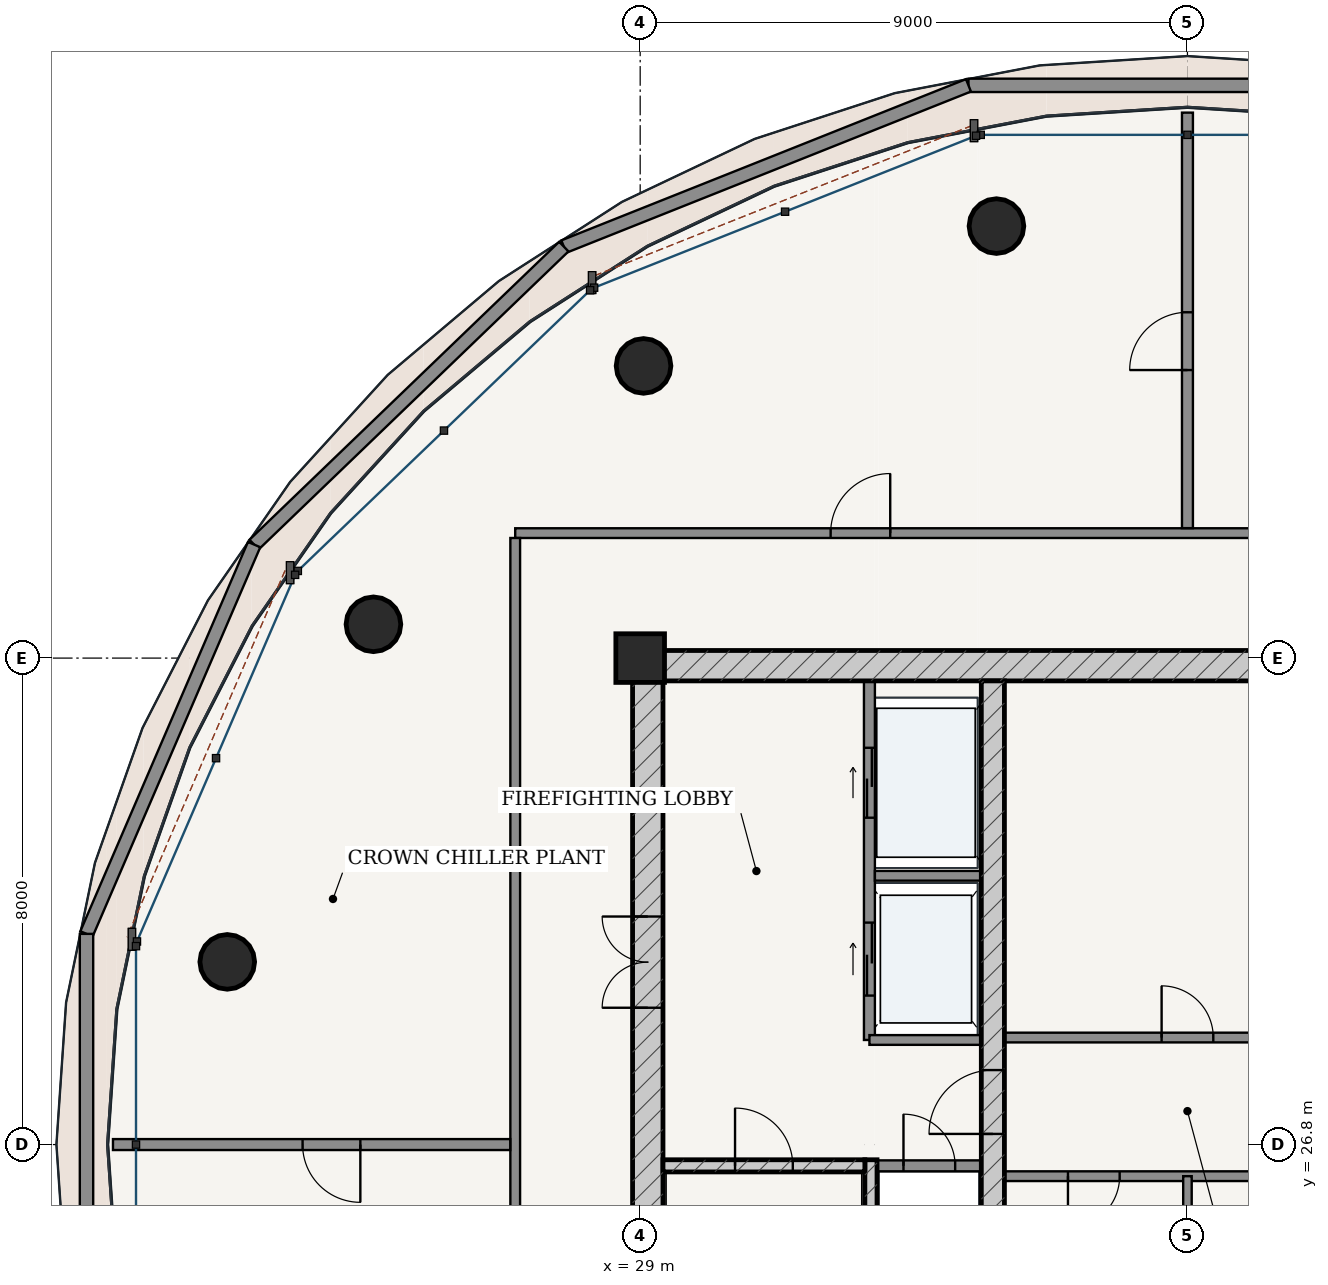
"""IFC4 building model, lengths in metres.
Left out: names, types, materials, properties, quantities, classifications, styles, units other than length and angle.
Written with IfcOpenShell. Run it as: python <this file> out.ifc"""

import sys

from ifc_helpers import new_model, si_unit, direction, frame, frame_2d, origin, origin_2d, place, context, subcontext, project, spatial, rectangle, hollow_circle, extrude, source, transform, mapped, element, fill, save


model = new_model("IFC4")
c1 = context("Model", 3, precision=1e-05, world=origin(), true_north=direction((-0.2419218956, 0.970295726276)))
c2 = subcontext(c1, "Body", "Model", "MODEL_VIEW")
j1 = project(units=[si_unit("LENGTHUNIT", "METRE"), si_unit("PLANEANGLEUNIT", "RADIAN")], contexts=[c1])
p1 = place(None, origin())
s1 = spatial("IfcSite", under=j1, at=p1, CompositionType="ELEMENT")
p2 = place(p1, origin())
s2 = spatial("IfcBuilding", under=s1, at=p2, CompositionType="ELEMENT")
p3 = place(p2, frame((0.0, 0.0, 306.1)))
s3 = spatial("IfcBuildingStorey", under=s2, at=p3, CompositionType="ELEMENT", Elevation=306.1)
p4 = place(p3, frame((29.0, 34.8, 0.0), z_axis=(0.0, 0.0, 1.0), x_axis=(1.0, 0.0, 0.0)))
e1 = element("IfcColumn", 1, at=p4, inside=s3, PredefinedType="COLUMN", context=c2, shape_type="SweptSolid", body=[
    extrude(rectangle(XDim=0.8, YDim=0.8, at=origin_2d()), origin(), (0.0, 0.0, 1.0), 5.2),
])
p5 = place(p3, frame((28.875, 34.675, 0.0), z_axis=(0.0, 0.0, 1.0), x_axis=(1.0, 0.0, 0.0)))
e2 = element("IfcWall", 2, at=p5, inside=s3, PredefinedType="SHEAR", context=c2, shape_type="SweptSolid", body=[
    extrude(rectangle(XDim=18.25, YDim=0.5, at=frame_2d((9.125, 0.0))), origin(), (0.0, 0.0, 1.0), 4.78),
])
p6 = place(p3, frame((29.125, 19.175, 0.0), z_axis=(0.0, 0.0, 1.0), x_axis=(0.0, 1.0, 0.0)))
e3 = element("IfcWall", 3, at=p6, inside=s3, PredefinedType="SHEAR", context=c2, shape_type="SweptSolid", body=[
    extrude(rectangle(XDim=15.25, YDim=0.5, at=frame_2d((7.625, 0.0))), origin(), (0.0, 0.0, 1.0), 4.78),
])
p7 = place(p6, frame((9.875, 0.0, 0.0)))
e4 = element("IfcOpeningElement", 4, at=p7, cuts=e3, PredefinedType="OPENING", context=c2, shape_type="SweptSolid", body=[
    extrude(rectangle(XDim=1.5, YDim=2.2, at=frame_2d((0.75, 1.1))), frame((0.0, 0.26, 0.0), z_axis=(0.0, -1.0, 0.0), x_axis=(1.0, 0.0, 0.0)), (0.0, 0.0, 1.0), 0.52),
])
p8 = place(p3, frame((32.795, 19.175, 0.0), z_axis=(0.0, 0.0, 1.0), x_axis=(0.0, 1.0, 0.0)))
e5 = element("IfcWall", 5, at=p8, inside=s3, PredefinedType="SOLIDWALL", context=c2, shape_type="SweptSolid", body=[
    extrude(rectangle(XDim=7.375, YDim=0.2, at=frame_2d((3.688, 0.0))), origin(), (0.0, 0.0, 1.0), 4.78),
])
p9 = place(p3, frame((29.375, 26.45, 0.0), z_axis=(0.0, 0.0, 1.0), x_axis=(1.0, 0.0, 0.0)))
e6 = element("IfcWall", 6, at=p9, inside=s3, PredefinedType="SOLIDWALL", context=c2, shape_type="SweptSolid", body=[
    extrude(rectangle(XDim=3.32, YDim=0.2, at=frame_2d((1.66, 0.0))), origin(), (0.0, 0.0, 1.0), 4.78),
])
p10 = place(p9, frame((1.185, 0.0, 0.0)))
e7 = element("IfcOpeningElement", 7, at=p10, cuts=e6, PredefinedType="OPENING", context=c2, shape_type="SweptSolid", body=[
    extrude(rectangle(XDim=0.95, YDim=2.15, at=frame_2d((0.475, 1.075))), frame((0.0, 0.11, 0.0), z_axis=(0.0, -1.0, 0.0), x_axis=(1.0, 0.0, 0.0)), (0.0, 0.0, 1.0), 0.22),
])
p11 = place(p3, frame((34.8, 19.175, 0.0), z_axis=(0.0, 0.0, 1.0), x_axis=(0.0, 1.0, 0.0)))
e8 = element("IfcWall", 8, at=p11, inside=s3, PredefinedType="SHEAR", context=c2, shape_type="SweptSolid", body=[
    extrude(rectangle(XDim=15.25, YDim=0.38, at=frame_2d((7.625, 0.0))), origin(), (0.0, 0.0, 1.0), 4.78),
])
p12 = place(p11, frame((7.8, 0.0, 0.0)))
e9 = element("IfcOpeningElement", 9, at=p12, cuts=e8, PredefinedType="OPENING", context=c2, shape_type="SweptSolid", body=[
    extrude(rectangle(XDim=1.05, YDim=2.15, at=frame_2d((0.525, 1.075))), frame((0.0, 0.2, 0.0), z_axis=(0.0, -1.0, 0.0), x_axis=(1.0, 0.0, 0.0)), (0.0, 0.0, 1.0), 0.4),
])
for number, where, z_axis, x_axis in (
    (10, (34.859, 41.904, 0.0), (0.0, 0.0, 1.0), (1.0, 0.0, 0.0)),
    (11, (29.055, 39.605, 0.0), (0.0, 0.0, 1.0), (1.0, 0.0, 0.0)),
    (12, (24.613, 35.356, 0.0), (0.0, 0.0, 1.0), (1.0, 0.0, 0.0)),
    (13, (22.209, 29.804, 0.0), (0.0, 0.0, 1.0), (1.0, 0.0, 0.0)),
):
    element("IfcColumn", number, at=place(p3, frame(where, z_axis=z_axis, x_axis=x_axis)), inside=s3, PredefinedType="COLUMN", context=c2, shape_type="SweptSolid", body=[
        extrude(hollow_circle(Radius=0.45, WallThickness=0.032, at=origin_2d()), origin(), (0.0, 0.0, 1.0), 5.2),
    ])
p13 = place(p3, frame((41.601, 44.219, 0.0), z_axis=(0.0, 0.0, 1.0), x_axis=(-1.0, 0.0, 0.0)))
e14 = element("IfcWall", 14, at=p13, inside=s3, PredefinedType="PARAPET", context=c2, shape_type="SweptSolid", body=[
    extrude(rectangle(XDim=7.203, YDim=0.22, at=frame_2d((3.601, 0.0))), origin(), (0.0, 0.0, 1.0), 1.15),
])
p14 = place(p3, frame((34.399, 44.219, 0.0), z_axis=(0.0, 0.0, 1.0), x_axis=(-0.928955406434, -0.370191643419, 0.0)))
e15 = element("IfcWall", 15, at=p14, inside=s3, PredefinedType="PARAPET", context=c2, shape_type="SweptSolid", body=[
    extrude(rectangle(XDim=7.164, YDim=0.22, at=frame_2d((3.582, 0.0))), origin(), (0.0, 0.0, 1.0), 1.15),
])
p15 = place(p3, frame((27.744, 41.567, 0.0), z_axis=(0.0, 0.0, 1.0), x_axis=(-0.720637211965, -0.693312345723, 0.0)))
e16 = element("IfcWall", 16, at=p15, inside=s3, PredefinedType="PARAPET", context=c2, shape_type="SweptSolid", body=[
    extrude(rectangle(XDim=7.067, YDim=0.22, at=frame_2d((3.534, 0.0))), origin(), (0.0, 0.0, 1.0), 1.15),
])
p16 = place(p3, frame((22.651, 36.667, 0.0), z_axis=(0.0, 0.0, 1.0), x_axis=(-0.39544480712, -0.918489741109, 0.0)))
e17 = element("IfcWall", 17, at=p16, inside=s3, PredefinedType="PARAPET", context=c2, shape_type="SweptSolid", body=[
    extrude(rectangle(XDim=6.97, YDim=0.22, at=frame_2d((3.485, 0.0))), origin(), (0.0, 0.0, 1.0), 1.15),
])
p17 = place(p3, frame((19.895, 30.265, 0.0), z_axis=(0.0, 0.0, 1.0), x_axis=(0.0, -1.0, 0.0)))
e18 = element("IfcWall", 18, at=p17, inside=s3, PredefinedType="PARAPET", context=c2, shape_type="SweptSolid", body=[
    extrude(rectangle(XDim=6.93, YDim=0.22, at=frame_2d((3.465, 0.0))), origin(), (0.0, 0.0, 1.0), 1.15),
])
p18 = place(p3, frame((32.9, 26.45, 0.0), z_axis=(0.0, 0.0, 1.0), x_axis=(1.0, 0.0, 0.0)))
e19 = element("IfcWall", 19, at=p18, inside=s3, PredefinedType="PARTITIONING", context=c2, shape_type="SweptSolid", body=[
    extrude(rectangle(XDim=1.71, YDim=0.18, at=frame_2d((0.855, 0.0))), origin(), (0.0, 0.0, 1.0), 4.78),
])
p19 = place(p18, frame((0.43, 0.0, 0.0)))
e20 = element("IfcOpeningElement", 20, at=p19, cuts=e19, PredefinedType="OPENING", context=c2, shape_type="SweptSolid", body=[
    extrude(rectangle(XDim=0.85, YDim=2.1, at=frame_2d((0.425, 1.05))), frame((0.0, 0.1, 0.0), z_axis=(0.0, -1.0, 0.0), x_axis=(1.0, 0.0, 0.0)), (0.0, 0.0, 1.0), 0.2),
])
p20 = place(p3, frame((32.77, 28.52, 0.0), z_axis=(0.0, 0.0, 1.0), x_axis=(0.0, 1.0, 0.0)))
e21 = element("IfcWall", 21, at=p20, inside=s3, PredefinedType="PARTITIONING", context=c2, shape_type="SweptSolid", body=[
    extrude(rectangle(XDim=5.905, YDim=0.18, at=frame_2d((2.953, 0.0))), origin(), (0.0, 0.0, 1.0), 4.78),
])
p21 = place(p20, frame((3.655, 0.0, 0.0)))
e22 = element("IfcOpeningElement", 22, at=p21, cuts=e21, PredefinedType="OPENING", context=c2, shape_type="SweptSolid", body=[
    extrude(rectangle(XDim=1.15, YDim=2.2, at=frame_2d((0.575, 1.1))), frame((0.0, 0.1, 0.0), z_axis=(0.0, -1.0, 0.0), x_axis=(1.0, 0.0, 0.0)), (0.0, 0.0, 1.0), 0.2),
])
p22 = place(p20, frame((0.73, 0.0, 0.0)))
e23 = element("IfcOpeningElement", 23, at=p22, cuts=e21, PredefinedType="OPENING", context=c2, shape_type="SweptSolid", body=[
    extrude(rectangle(XDim=1.2, YDim=2.25, at=frame_2d((0.6, 1.125))), frame((0.0, 0.1, 0.0), z_axis=(0.0, -1.0, 0.0), x_axis=(1.0, 0.0, 0.0)), (0.0, 0.0, 1.0), 0.2),
])
p23 = place(p3, frame((32.86, 31.22, 0.0), z_axis=(0.0, 0.0, 1.0), x_axis=(1.0, 0.0, 0.0)))
e24 = element("IfcWall", 24, at=p23, inside=s3, PredefinedType="PARTITIONING", context=c2, shape_type="SweptSolid", body=[
    extrude(rectangle(XDim=1.75, YDim=0.16, at=frame_2d((0.875, 0.0))), origin(), (0.0, 0.0, 1.0), 4.78),
])
p24 = place(p3, frame((32.77, 28.52, 0.0), z_axis=(0.0, 0.0, 1.0), x_axis=(1.0, 0.0, 0.0)))
e25 = element("IfcWall", 25, at=p24, inside=s3, PredefinedType="PARTITIONING", context=c2, shape_type="SweptSolid", body=[
    extrude(rectangle(XDim=1.84, YDim=0.16, at=frame_2d((0.92, 0.0))), origin(), (0.0, 0.0, 1.0), 4.78),
])
p25 = place(p3, frame((34.99, 28.56, 0.0), z_axis=(0.0, 0.0, 1.0), x_axis=(1.0, 0.0, 0.0)))
e26 = element("IfcWall", 26, at=p25, inside=s3, PredefinedType="PARTITIONING", context=c2, shape_type="SweptSolid", body=[
    extrude(rectangle(XDim=6.02, YDim=0.16, at=frame_2d((3.01, 0.0))), origin(), (0.0, 0.0, 1.0), 4.78),
])
p26 = place(p25, frame((2.585, 0.0, 0.0)))
e27 = element("IfcOpeningElement", 27, at=p26, cuts=e26, PredefinedType="OPENING", context=c2, shape_type="SweptSolid", body=[
    extrude(rectangle(XDim=0.85, YDim=2.1, at=frame_2d((0.425, 1.05))), frame((0.0, 0.09, 0.0), z_axis=(0.0, -1.0, 0.0), x_axis=(1.0, 0.0, 0.0)), (0.0, 0.0, 1.0), 0.18),
])
p27 = place(p3, frame((34.99, 26.28, 0.0), z_axis=(0.0, 0.0, 1.0), x_axis=(1.0, 0.0, 0.0)))
e28 = element("IfcWall", 28, at=p27, inside=s3, PredefinedType="PARTITIONING", context=c2, shape_type="SweptSolid", body=[
    extrude(rectangle(XDim=6.02, YDim=0.16, at=frame_2d((3.01, 0.0))), origin(), (0.0, 0.0, 1.0), 4.78),
])
p28 = place(p27, frame((1.045, 0.0, 0.0)))
e29 = element("IfcOpeningElement", 29, at=p28, cuts=e28, PredefinedType="OPENING", context=c2, shape_type="SweptSolid", body=[
    extrude(rectangle(XDim=0.85, YDim=2.1, at=frame_2d((0.425, 1.05))), frame((0.0, 0.09, 0.0), z_axis=(0.0, -1.0, 0.0), x_axis=(1.0, 0.0, 0.0)), (0.0, 0.0, 1.0), 0.18),
])
p29 = place(p27, frame((4.125, 0.0, 0.0)))
e30 = element("IfcOpeningElement", 30, at=p29, cuts=e28, PredefinedType="OPENING", context=c2, shape_type="SweptSolid", body=[
    extrude(rectangle(XDim=0.85, YDim=2.1, at=frame_2d((0.425, 1.05))), frame((0.0, 0.09, 0.0), z_axis=(0.0, -1.0, 0.0), x_axis=(1.0, 0.0, 0.0)), (0.0, 0.0, 1.0), 0.18),
])
p30 = place(p3, frame((38.0, 23.72, 0.0), z_axis=(0.0, 0.0, 1.0), x_axis=(0.0, 1.0, 0.0)))
e31 = element("IfcWall", 31, at=p30, inside=s3, PredefinedType="PARTITIONING", context=c2, shape_type="SweptSolid", body=[
    extrude(rectangle(XDim=2.56, YDim=0.14, at=frame_2d((1.28, 0.0))), origin(), (0.0, 0.0, 1.0), 4.78),
])
p31 = place(p3, frame((26.945, 36.855, 0.0), z_axis=(0.0, 0.0, 1.0), x_axis=(1.0, 0.0, 0.0)))
e32 = element("IfcWall", 32, at=p31, inside=s3, PredefinedType="PARTITIONING", context=c2, shape_type="SweptSolid", body=[
    extrude(rectangle(XDim=22.11, YDim=0.16, at=frame_2d((11.055, 0.0))), origin(), (0.0, 0.0, 1.0), 4.352),
])
p32 = place(p31, frame((15.943, 0.0, 0.0)))
e33 = element("IfcOpeningElement", 33, at=p32, cuts=e32, PredefinedType="OPENING", context=c2, shape_type="SweptSolid", body=[
    extrude(rectangle(XDim=0.98, YDim=2.2, at=frame_2d((0.49, 1.1))), frame((0.0, 0.09, 0.0), z_axis=(0.0, -1.0, 0.0), x_axis=(1.0, 0.0, 0.0)), (0.0, 0.0, 1.0), 0.18),
])
p33 = place(p31, frame((5.187, 0.0, 0.0)))
e34 = element("IfcOpeningElement", 34, at=p33, cuts=e32, PredefinedType="OPENING", context=c2, shape_type="SweptSolid", body=[
    extrude(rectangle(XDim=0.98, YDim=2.2, at=frame_2d((0.49, 1.1))), frame((0.0, 0.09, 0.0), z_axis=(0.0, -1.0, 0.0), x_axis=(1.0, 0.0, 0.0)), (0.0, 0.0, 1.0), 0.18),
])
p34 = place(p3, frame((26.945, 16.825, 0.0), z_axis=(0.0, 0.0, 1.0), x_axis=(0.0, 1.0, 0.0)))
e35 = element("IfcWall", 35, at=p34, inside=s3, PredefinedType="PARTITIONING", context=c2, shape_type="SweptSolid", body=[
    extrude(rectangle(XDim=19.95, YDim=0.16, at=frame_2d((9.975, 0.0))), origin(), (0.0, 0.0, 1.0), 4.352),
])
p35 = place(p3, frame((38.0, 36.937, 0.0), z_axis=(0.0, 0.0, 1.0), x_axis=(0.0, 1.0, 0.0)))
e36 = element("IfcWall", 36, at=p35, inside=s3, PredefinedType="PARTITIONING", context=c2, shape_type="SweptSolid", body=[
    extrude(rectangle(XDim=6.833, YDim=0.18, at=frame_2d((3.417, 0.0))), origin(), (0.0, 0.0, 1.0), 4.411),
])
p36 = place(p35, frame((2.6, 0.0, 0.0)))
e37 = element("IfcOpeningElement", 37, at=p36, cuts=e36, PredefinedType="OPENING", context=c2, shape_type="SweptSolid", body=[
    extrude(rectangle(XDim=0.95, YDim=2.15, at=frame_2d((0.475, 1.075))), frame((0.0, 0.1, 0.0), z_axis=(0.0, -1.0, 0.0), x_axis=(1.0, 0.0, 0.0)), (0.0, 0.0, 1.0), 0.2),
])
p37 = place(p3, frame((26.863, 26.8, 0.0), z_axis=(0.0, 0.0, 1.0), x_axis=(-1.0, 0.0, 0.0)))
e38 = element("IfcWall", 38, at=p37, inside=s3, PredefinedType="PARTITIONING", context=c2, shape_type="SweptSolid", body=[
    extrude(rectangle(XDim=6.533, YDim=0.18, at=frame_2d((3.267, 0.0))), origin(), (0.0, 0.0, 1.0), 4.411),
])
p38 = place(p37, frame((2.465, 0.0, 0.0)))
e39 = element("IfcOpeningElement", 39, at=p38, cuts=e38, PredefinedType="OPENING", context=c2, shape_type="SweptSolid", body=[
    extrude(rectangle(XDim=0.95, YDim=2.15, at=frame_2d((0.475, 1.075))), frame((0.0, 0.1, 0.0), z_axis=(0.0, -1.0, 0.0), x_axis=(1.0, 0.0, 0.0)), (0.0, 0.0, 1.0), 0.2),
])
m1 = source(origin(), c2, "Body", "SweptSolid", [
    extrude(rectangle(XDim=1.5, YDim=2.2, at=frame_2d((0.75, 1.1))), frame((0.0, 0.025, 0.0), z_axis=(0.0, -1.0, 0.0), x_axis=(1.0, 0.0, 0.0)), (0.0, 0.0, 1.0), 0.05),
])
p39 = place(p7, origin())
e40 = element("IfcDoor", 40, at=p39, inside=s3, OperationType="DOUBLE_DOOR_SINGLE_SWING", PredefinedType="DOOR", context=c2, shape_type="MappedRepresentation", body=[
    mapped(m1, transform((0.0, 0.0, 0.0), scale=1.0)),
])
fill(e4, e40)
m2 = source(origin(), c2, "Body", "SweptSolid", [
    extrude(rectangle(XDim=1.05, YDim=2.15, at=frame_2d((0.525, 1.075))), frame((0.0, 0.025, 0.0), z_axis=(0.0, -1.0, 0.0), x_axis=(1.0, 0.0, 0.0)), (0.0, 0.0, 1.0), 0.05),
])
p40 = place(p12, origin())
e41 = element("IfcDoor", 41, at=p40, inside=s3, OperationType="SINGLE_SWING_LEFT", PredefinedType="DOOR", context=c2, shape_type="MappedRepresentation", body=[
    mapped(m2, transform((0.0, 0.0, 0.0), scale=1.0)),
])
fill(e9, e41)
m3 = source(origin(), c2, "Body", "SweptSolid", [
    extrude(rectangle(XDim=0.95, YDim=2.15, at=frame_2d((0.475, 1.075))), frame((0.0, 0.025, 0.0), z_axis=(0.0, -1.0, 0.0), x_axis=(1.0, 0.0, 0.0)), (0.0, 0.0, 1.0), 0.05),
])
p41 = place(p10, origin())
e42 = element("IfcDoor", 42, at=p41, inside=s3, OperationType="SINGLE_SWING_LEFT", PredefinedType="DOOR", context=c2, shape_type="MappedRepresentation", body=[
    mapped(m3, transform((0.0, 0.0, 0.0), scale=1.0)),
])
fill(e7, e42)
m4 = source(origin(), c2, "Body", "SweptSolid", [
    extrude(rectangle(XDim=0.85, YDim=2.1, at=frame_2d((0.425, 1.05))), frame((0.0, 0.025, 0.0), z_axis=(0.0, -1.0, 0.0), x_axis=(1.0, 0.0, 0.0)), (0.0, 0.0, 1.0), 0.05),
])
p42 = place(p19, origin())
e43 = element("IfcDoor", 43, at=p42, inside=s3, OperationType="SINGLE_SWING_LEFT", PredefinedType="DOOR", context=c2, shape_type="MappedRepresentation", body=[
    mapped(m4, transform((0.0, 0.0, 0.0), scale=1.0)),
])
fill(e20, e43)
p43 = place(p26, origin())
e44 = element("IfcDoor", 44, at=p43, inside=s3, OperationType="SINGLE_SWING_LEFT", PredefinedType="DOOR", context=c2, shape_type="MappedRepresentation", body=[
    mapped(m4, transform((0.0, 0.0, 0.0), scale=1.0)),
])
fill(e27, e44)
p44 = place(p28, frame((0.85, 0.0, 0.0), z_axis=(0.0, 0.0, 1.0), x_axis=(-1.0, 0.0, 0.0)))
e45 = element("IfcDoor", 45, at=p44, inside=s3, OperationType="SINGLE_SWING_RIGHT", PredefinedType="DOOR", context=c2, shape_type="MappedRepresentation", body=[
    mapped(m4, transform((0.0, 0.0, 0.0), scale=1.0)),
])
fill(e29, e45)
m5 = source(origin(), c2, "Body", "SweptSolid", [
    extrude(rectangle(XDim=1.15, YDim=2.2, at=frame_2d((0.575, 1.1))), frame((0.0, 0.025, 0.0), z_axis=(0.0, -1.0, 0.0), x_axis=(1.0, 0.0, 0.0)), (0.0, 0.0, 1.0), 0.05),
])
p45 = place(p21, origin())
e46 = element("IfcDoor", 46, at=p45, inside=s3, OperationType="DOUBLE_DOOR_SLIDING", PredefinedType="DOOR", context=c2, shape_type="MappedRepresentation", body=[
    mapped(m5, transform((0.0, 0.0, 0.0), scale=1.0)),
])
fill(e22, e46)
m6 = source(origin(), c2, "Body", "SweptSolid", [
    extrude(rectangle(XDim=1.2, YDim=2.25, at=frame_2d((0.6, 1.125))), frame((0.0, 0.025, 0.0), z_axis=(0.0, -1.0, 0.0), x_axis=(1.0, 0.0, 0.0)), (0.0, 0.0, 1.0), 0.05),
])
p46 = place(p22, origin())
e47 = element("IfcDoor", 47, at=p46, inside=s3, OperationType="DOUBLE_DOOR_SLIDING", PredefinedType="DOOR", context=c2, shape_type="MappedRepresentation", body=[
    mapped(m6, transform((0.0, 0.0, 0.0), scale=1.0)),
])
fill(e23, e47)
m7 = source(origin(), c2, "Body", "SweptSolid", [
    extrude(rectangle(XDim=0.98, YDim=2.2, at=frame_2d((0.49, 1.1))), frame((0.0, 0.025, 0.0), z_axis=(0.0, -1.0, 0.0), x_axis=(1.0, 0.0, 0.0)), (0.0, 0.0, 1.0), 0.05),
])
p47 = place(p33, origin())
e48 = element("IfcDoor", 48, at=p47, inside=s3, OperationType="SINGLE_SWING_RIGHT", PredefinedType="DOOR", context=c2, shape_type="MappedRepresentation", body=[
    mapped(m7, transform((0.0, 0.0, 0.0), scale=1.0)),
])
fill(e34, e48)
p48 = place(p36, origin())
e49 = element("IfcDoor", 49, at=p48, inside=s3, OperationType="SINGLE_SWING_LEFT", PredefinedType="DOOR", context=c2, shape_type="MappedRepresentation", body=[
    mapped(m3, transform((0.0, 0.0, 0.0), scale=1.0)),
])
fill(e37, e49)
p49 = place(p38, origin())
e50 = element("IfcDoor", 50, at=p49, inside=s3, OperationType="SINGLE_SWING_LEFT", PredefinedType="DOOR", context=c2, shape_type="MappedRepresentation", body=[
    mapped(m3, transform((0.0, 0.0, 0.0), scale=1.0)),
])
fill(e39, e50)
save(model, sys.argv[1])
